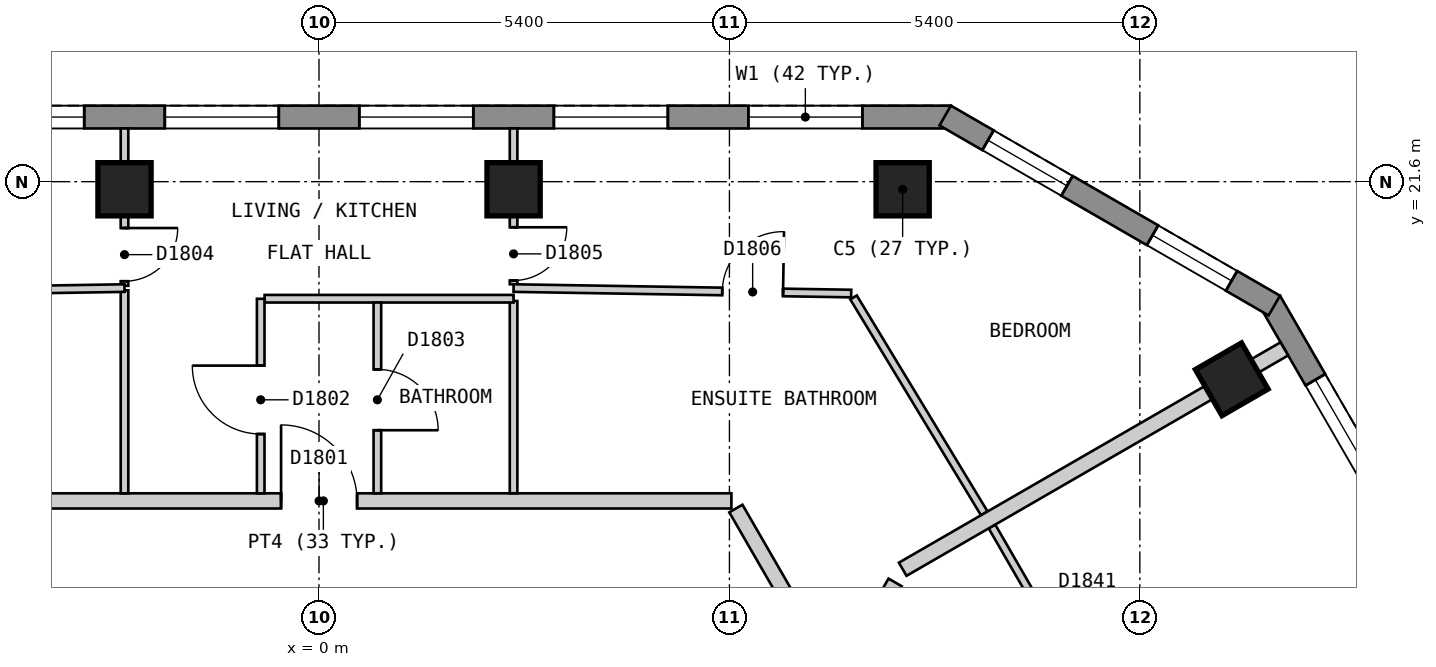
"""IFC4 building model, lengths in metres.
Left out: names, types, materials, properties, quantities, classifications, styles, units other than length and angle.
Written with IfcOpenShell. Run it as: python <this file> out.ifc"""

import sys

from ifc_helpers import new_model, si_unit, direction, frame, frame_2d, origin, origin_2d, place, context, subcontext, project, spatial, polyline, rectangle, outline, extrude, element, fill, save


model = new_model("IFC4")
c1 = context("Model", 3, precision=1e-05, world=origin(), true_north=direction((0.0, 1.0)))
c2 = subcontext(c1, "Body", "Model", "MODEL_VIEW")
j1 = project(units=[si_unit("LENGTHUNIT", "METRE"), si_unit("PLANEANGLEUNIT", "RADIAN")], contexts=[c1])
p1 = place(None, origin())
s1 = spatial("IfcSite", under=j1, at=p1, CompositionType="ELEMENT")
p2 = place(p1, origin())
s2 = spatial("IfcBuilding", under=s1, at=p2, CompositionType="ELEMENT")
p3 = place(p2, frame((0.0, 0.0, 208.8)))
s3 = spatial("IfcBuildingStorey", under=s2, at=p3, CompositionType="ELEMENT", Elevation=208.8)
for number, where, z_axis, x_axis in (
    (1, (7.679, 21.5, 0.0), (0.0, 0.0, 1.0), (-1.0, 0.0, 0.0)),
    (2, (2.56, 21.5, 0.0), (0.0, 0.0, 1.0), (-1.0, 0.0, 0.0)),
    (3, (-2.559, 21.5, 0.0), (0.0, 0.0, 1.0), (-1.0, 0.0, 0.0)),
    (4, (12.009, 19.0, 0.0), (0.0, 0.0, 1.0), (-0.5, 0.866, 0.0)),
):
    element("IfcColumn", number, at=place(p3, frame(where, z_axis=z_axis, x_axis=x_axis)), inside=s3, PredefinedType="COLUMN", context=c2, shape_type="SweptSolid", body=[
        extrude(rectangle(XDim=0.7, YDim=0.7, at=origin_2d()), origin(), (0.0, 0.0, 1.0), 3.0),
    ])
p4 = place(p3, frame((8.314, 22.45, 0.0), z_axis=(0.0, 0.0, 1.0), x_axis=(-1.0, 0.0, 0.0)))
e5 = element("IfcWall", 5, at=p4, inside=s3, PredefinedType="SOLIDWALL", context=c2, shape_type="SweptSolid", body=[
    extrude(outline(polyline([(0.0, -0.15), (16.628, -0.15), (16.548, 0.15), (0.08, 0.15), (0.0, -0.15)])), origin(), (0.0, 0.0, 1.0), 2.7),
])
p5 = place(p4, frame((1.165, 0.0, 0.15)))
e6 = element("IfcOpeningElement", 6, at=p5, cuts=e5, PredefinedType="OPENING", context=c2, shape_type="SweptSolid", body=[
    extrude(rectangle(XDim=1.5, YDim=2.1, at=frame_2d((0.75, 1.05))), frame((0.0, 0.16, 0.0), z_axis=(0.0, -1.0, 0.0), x_axis=(1.0, 0.0, 0.0)), (0.0, 0.0, 1.0), 0.32),
])
p6 = place(p4, frame((3.724, 0.0, 0.15)))
e7 = element("IfcOpeningElement", 7, at=p6, cuts=e5, PredefinedType="OPENING", context=c2, shape_type="SweptSolid", body=[
    extrude(rectangle(XDim=1.5, YDim=2.1, at=frame_2d((0.75, 1.05))), frame((0.0, 0.16, 0.0), z_axis=(0.0, -1.0, 0.0), x_axis=(1.0, 0.0, 0.0)), (0.0, 0.0, 1.0), 0.32),
])
p7 = place(p4, frame((6.284, 0.0, 0.15)))
e8 = element("IfcOpeningElement", 8, at=p7, cuts=e5, PredefinedType="OPENING", context=c2, shape_type="SweptSolid", body=[
    extrude(rectangle(XDim=1.5, YDim=2.1, at=frame_2d((0.75, 1.05))), frame((0.0, 0.16, 0.0), z_axis=(0.0, -1.0, 0.0), x_axis=(1.0, 0.0, 0.0)), (0.0, 0.0, 1.0), 0.32),
])
p8 = place(p4, frame((8.843, 0.0, 0.15)))
e9 = element("IfcOpeningElement", 9, at=p8, cuts=e5, PredefinedType="OPENING", context=c2, shape_type="SweptSolid", body=[
    extrude(rectangle(XDim=1.5, YDim=2.1, at=frame_2d((0.75, 1.05))), frame((0.0, 0.16, 0.0), z_axis=(0.0, -1.0, 0.0), x_axis=(1.0, 0.0, 0.0)), (0.0, 0.0, 1.0), 0.32),
])
p9 = place(p4, frame((11.403, 0.0, 0.15)))
e10 = element("IfcOpeningElement", 10, at=p9, cuts=e5, PredefinedType="OPENING", context=c2, shape_type="SweptSolid", body=[
    extrude(rectangle(XDim=1.5, YDim=2.1, at=frame_2d((0.75, 1.05))), frame((0.0, 0.16, 0.0), z_axis=(0.0, -1.0, 0.0), x_axis=(1.0, 0.0, 0.0)), (0.0, 0.0, 1.0), 0.32),
])
p10 = place(p4, frame((13.962, 0.0, 0.15)))
e11 = element("IfcOpeningElement", 11, at=p10, cuts=e5, PredefinedType="OPENING", context=c2, shape_type="SweptSolid", body=[
    extrude(rectangle(XDim=1.5, YDim=2.1, at=frame_2d((0.75, 1.05))), frame((0.0, 0.16, 0.0), z_axis=(0.0, -1.0, 0.0), x_axis=(1.0, 0.0, 0.0)), (0.0, 0.0, 1.0), 0.32),
])
p11 = place(p3, frame((23.599, 0.825, 0.0), z_axis=(0.0, 0.0, 1.0), x_axis=(-0.500003656944, 0.866023292436, 0.0)))
e12 = element("IfcWall", 12, at=p11, inside=s3, PredefinedType="SOLIDWALL", context=c2, shape_type="SweptSolid", body=[
    extrude(outline(polyline([(0.0, -0.15), (22.17, -0.15), (22.09, 0.15), (0.08, 0.15), (0.0, -0.15)])), origin(), (0.0, 0.0, 1.0), 2.7),
])
p12 = place(p11, frame((1.191, 0.0, 0.15)))
e13 = element("IfcOpeningElement", 13, at=p12, cuts=e12, PredefinedType="OPENING", context=c2, shape_type="SweptSolid", body=[
    extrude(rectangle(XDim=1.5, YDim=2.1, at=frame_2d((0.75, 1.05))), frame((0.0, 0.16, 0.0), z_axis=(0.0, -1.0, 0.0), x_axis=(1.0, 0.0, 0.0)), (0.0, 0.0, 1.0), 0.32),
])
p13 = place(p11, frame((3.804, 0.0, 0.15)))
e14 = element("IfcOpeningElement", 14, at=p13, cuts=e12, PredefinedType="OPENING", context=c2, shape_type="SweptSolid", body=[
    extrude(rectangle(XDim=1.5, YDim=2.1, at=frame_2d((0.75, 1.05))), frame((0.0, 0.16, 0.0), z_axis=(0.0, -1.0, 0.0), x_axis=(1.0, 0.0, 0.0)), (0.0, 0.0, 1.0), 0.32),
])
p14 = place(p11, frame((6.417, 0.0, 0.15)))
e15 = element("IfcOpeningElement", 15, at=p14, cuts=e12, PredefinedType="OPENING", context=c2, shape_type="SweptSolid", body=[
    extrude(rectangle(XDim=1.5, YDim=2.1, at=frame_2d((0.75, 1.05))), frame((0.0, 0.16, 0.0), z_axis=(0.0, -1.0, 0.0), x_axis=(1.0, 0.0, 0.0)), (0.0, 0.0, 1.0), 0.32),
])
p15 = place(p11, frame((9.029, 0.0, 0.15)))
e16 = element("IfcOpeningElement", 16, at=p15, cuts=e12, PredefinedType="OPENING", context=c2, shape_type="SweptSolid", body=[
    extrude(rectangle(XDim=1.5, YDim=2.1, at=frame_2d((0.75, 1.05))), frame((0.0, 0.16, 0.0), z_axis=(0.0, -1.0, 0.0), x_axis=(1.0, 0.0, 0.0)), (0.0, 0.0, 1.0), 0.32),
])
p16 = place(p11, frame((11.641, 0.0, 0.15)))
e17 = element("IfcOpeningElement", 17, at=p16, cuts=e12, PredefinedType="OPENING", context=c2, shape_type="SweptSolid", body=[
    extrude(rectangle(XDim=1.5, YDim=2.1, at=frame_2d((0.75, 1.05))), frame((0.0, 0.16, 0.0), z_axis=(0.0, -1.0, 0.0), x_axis=(1.0, 0.0, 0.0)), (0.0, 0.0, 1.0), 0.32),
])
p17 = place(p11, frame((14.254, 0.0, 0.15)))
e18 = element("IfcOpeningElement", 18, at=p17, cuts=e12, PredefinedType="OPENING", context=c2, shape_type="SweptSolid", body=[
    extrude(rectangle(XDim=1.5, YDim=2.1, at=frame_2d((0.75, 1.05))), frame((0.0, 0.16, 0.0), z_axis=(0.0, -1.0, 0.0), x_axis=(1.0, 0.0, 0.0)), (0.0, 0.0, 1.0), 0.32),
])
p18 = place(p11, frame((16.866, 0.0, 0.15)))
e19 = element("IfcOpeningElement", 19, at=p18, cuts=e12, PredefinedType="OPENING", context=c2, shape_type="SweptSolid", body=[
    extrude(rectangle(XDim=1.5, YDim=2.1, at=frame_2d((0.75, 1.05))), frame((0.0, 0.16, 0.0), z_axis=(0.0, -1.0, 0.0), x_axis=(1.0, 0.0, 0.0)), (0.0, 0.0, 1.0), 0.32),
])
p19 = place(p11, frame((19.479, 0.0, 0.15)))
e20 = element("IfcOpeningElement", 20, at=p19, cuts=e12, PredefinedType="OPENING", context=c2, shape_type="SweptSolid", body=[
    extrude(rectangle(XDim=1.5, YDim=2.1, at=frame_2d((0.75, 1.05))), frame((0.0, 0.16, 0.0), z_axis=(0.0, -1.0, 0.0), x_axis=(1.0, 0.0, 0.0)), (0.0, 0.0, 1.0), 0.32),
])
p20 = place(p3, frame((12.569, 19.97, 0.0), z_axis=(0.0, 0.0, 1.0), x_axis=(-0.866022959057, 0.500004234368, 0.0)))
e21 = element("IfcWall", 21, at=p20, inside=s3, PredefinedType="SOLIDWALL", context=c2, shape_type="SweptSolid", body=[
    extrude(outline(polyline([(0.0, -0.15), (5.0, -0.15), (4.92, 0.15), (0.08, 0.15), (0.0, -0.15)])), origin(), (0.0, 0.0, 1.0), 2.7),
])
p21 = place(p20, frame((0.65, 0.0, 0.15)))
e22 = element("IfcOpeningElement", 22, at=p21, cuts=e21, PredefinedType="OPENING", context=c2, shape_type="SweptSolid", body=[
    extrude(rectangle(XDim=1.2, YDim=2.1, at=frame_2d((0.6, 1.05))), frame((0.0, 0.16, 0.0), z_axis=(0.0, -1.0, 0.0), x_axis=(1.0, 0.0, 0.0)), (0.0, 0.0, 1.0), 0.32),
])
p22 = place(p20, frame((3.15, 0.0, 0.15)))
e23 = element("IfcOpeningElement", 23, at=p22, cuts=e21, PredefinedType="OPENING", context=c2, shape_type="SweptSolid", body=[
    extrude(rectangle(XDim=1.2, YDim=2.1, at=frame_2d((0.6, 1.05))), frame((0.0, 0.16, 0.0), z_axis=(0.0, -1.0, 0.0), x_axis=(1.0, 0.0, 0.0)), (0.0, 0.0, 1.0), 0.32),
])
p23 = place(p3, frame((5.485, 17.3, 0.0), z_axis=(0.0, 0.0, 1.0), x_axis=(0.499943285704, -0.866058145322, 0.0)))
e24 = element("IfcWall", 24, at=p23, inside=s3, PredefinedType="PARTITIONING", context=c2, shape_type="SweptSolid", body=[
    extrude(rectangle(XDim=10.623, YDim=0.2, at=frame_2d((5.312, 0.0))), origin(), (0.0, 0.0, 1.0), 2.7),
])
p24 = place(p23, frame((3.901, 0.0, 0.0)))
e25 = element("IfcOpeningElement", 25, at=p24, cuts=e24, PredefinedType="OPENING", context=c2, shape_type="SweptSolid", body=[
    extrude(rectangle(XDim=1.0, YDim=2.1, at=frame_2d((0.5, 1.05))), frame((0.0, 0.11, 0.0), z_axis=(0.0, -1.0, 0.0), x_axis=(1.0, 0.0, 0.0)), (0.0, 0.0, 1.0), 0.22),
])
p25 = place(p3, frame((-5.311, 17.4, 0.0), z_axis=(0.0, 0.0, 1.0), x_axis=(1.0, 0.0, 0.0)))
e26 = element("IfcWall", 26, at=p25, inside=s3, PredefinedType="PARTITIONING", context=c2, shape_type="SweptSolid", body=[
    extrude(rectangle(XDim=10.737, YDim=0.2, at=frame_2d((5.369, 0.0))), origin(), (0.0, 0.0, 1.0), 2.7),
])
p26 = place(p25, frame((4.812, 0.0, 0.0)))
e27 = element("IfcOpeningElement", 27, at=p26, cuts=e26, PredefinedType="OPENING", context=c2, shape_type="SweptSolid", body=[
    extrude(rectangle(XDim=1.0, YDim=2.1, at=frame_2d((0.5, 1.05))), frame((0.0, 0.11, 0.0), z_axis=(0.0, -1.0, 0.0), x_axis=(1.0, 0.0, 0.0)), (0.0, 0.0, 1.0), 0.22),
])
p27 = place(p3, frame((7.033, 20.077, 0.0), z_axis=(0.0, 0.0, 1.0), x_axis=(0.517918779664, -0.855429797044, 0.0)))
e28 = element("IfcWall", 28, at=p27, inside=s3, PredefinedType="PARTITIONING", context=c2, shape_type="SweptSolid", body=[
    extrude(rectangle(XDim=3.321, YDim=0.1, at=frame_2d((1.661, 0.0))), origin(), (0.0, 0.0, 1.0), 2.7),
])
p28 = place(p3, frame((8.854, 17.064, 0.0), z_axis=(0.0, 0.0, 1.0), x_axis=(0.500042049778, -0.866001124973, 0.0)))
e29 = element("IfcWall", 29, at=p28, inside=s3, PredefinedType="PARTITIONING", context=c2, shape_type="SweptSolid", body=[
    extrude(rectangle(XDim=5.025, YDim=0.1, at=frame_2d((2.513, 0.0))), origin(), (0.0, 0.0, 1.0), 2.7),
])
p29 = place(p28, frame((2.063, 0.0, 0.0)))
e30 = element("IfcOpeningElement", 30, at=p29, cuts=e29, PredefinedType="OPENING", context=c2, shape_type="SweptSolid", body=[
    extrude(rectangle(XDim=0.9, YDim=2.1, at=frame_2d((0.45, 1.05))), frame((0.0, 0.06, 0.0), z_axis=(0.0, -1.0, 0.0), x_axis=(1.0, 0.0, 0.0)), (0.0, 0.0, 1.0), 0.12),
])
p30 = place(p3, frame((-2.559, 20.17, 0.0), z_axis=(0.0, 0.0, 1.0), x_axis=(0.0, -1.0, 0.0)))
e31 = element("IfcWall", 31, at=p30, inside=s3, PredefinedType="PARTITIONING", context=c2, shape_type="SweptSolid", body=[
    extrude(rectangle(XDim=2.67, YDim=0.1, at=frame_2d((1.335, 0.0))), origin(), (0.0, 0.0, 1.0), 2.7),
])
p31 = place(p3, frame((2.56, 22.3, 0.0), z_axis=(0.0, 0.0, 1.0), x_axis=(0.0, -1.0, 0.0)))
e32 = element("IfcWall", 32, at=p31, inside=s3, PredefinedType="PARTITIONING", context=c2, shape_type="SweptSolid", body=[
    extrude(rectangle(XDim=2.05, YDim=0.1, at=frame_2d((1.025, 0.0))), origin(), (0.0, 0.0, 1.0), 2.7),
])
p32 = place(p31, frame((1.3, 0.0, 0.0)))
e33 = element("IfcOpeningElement", 33, at=p32, cuts=e32, PredefinedType="OPENING", context=c2, shape_type="SweptSolid", body=[
    extrude(rectangle(XDim=0.7, YDim=2.1, at=frame_2d((0.35, 1.05))), frame((0.0, 0.06, 0.0), z_axis=(0.0, -1.0, 0.0), x_axis=(1.0, 0.0, 0.0)), (0.0, 0.0, 1.0), 0.12),
])
p33 = place(p3, frame((2.56, 20.03, 0.0), z_axis=(0.0, 0.0, 1.0), x_axis=(0.0, -1.0, 0.0)))
e34 = element("IfcWall", 34, at=p33, inside=s3, PredefinedType="PARTITIONING", context=c2, shape_type="SweptSolid", body=[
    extrude(rectangle(XDim=2.53, YDim=0.1, at=frame_2d((1.265, 0.0))), origin(), (0.0, 0.0, 1.0), 2.7),
])
p34 = place(p3, frame((2.56, 20.2, 0.0), z_axis=(0.0, 0.0, 1.0), x_axis=(0.999868576801, -0.016212005615, 0.0)))
e35 = element("IfcWall", 35, at=p34, inside=s3, PredefinedType="PARTITIONING", context=c2, shape_type="SweptSolid", body=[
    extrude(rectangle(XDim=4.442, YDim=0.1, at=frame_2d((2.221, 0.0))), origin(), (0.0, 0.0, 1.0), 2.7),
])
p35 = place(p34, frame((2.746, 0.0, 0.0)))
e36 = element("IfcOpeningElement", 36, at=p35, cuts=e35, PredefinedType="OPENING", context=c2, shape_type="SweptSolid", body=[
    extrude(rectangle(XDim=0.8, YDim=2.1, at=frame_2d((0.4, 1.05))), frame((0.0, 0.06, 0.0), z_axis=(0.0, -1.0, 0.0), x_axis=(1.0, 0.0, 0.0)), (0.0, 0.0, 1.0), 0.12),
])
p36 = place(p3, frame((-0.716, 20.06, 0.0), z_axis=(0.0, 0.0, 1.0), x_axis=(1.0, 0.0, 0.0)))
e37 = element("IfcWall", 37, at=p36, inside=s3, PredefinedType="PARTITIONING", context=c2, shape_type="SweptSolid", body=[
    extrude(rectangle(XDim=3.276, YDim=0.1, at=frame_2d((1.638, 0.0))), origin(), (0.0, 0.0, 1.0), 2.7),
])
p37 = place(p3, frame((0.768, 17.5, 0.0), z_axis=(0.0, 0.0, 1.0), x_axis=(0.0, 1.0, 0.0)))
e38 = element("IfcWall", 38, at=p37, inside=s3, PredefinedType="PARTITIONING", context=c2, shape_type="SweptSolid", body=[
    extrude(rectangle(XDim=2.51, YDim=0.1, at=frame_2d((1.255, 0.0))), origin(), (0.0, 0.0, 1.0), 2.7),
])
p38 = place(p37, frame((0.83, 0.0, 0.0)))
e39 = element("IfcOpeningElement", 39, at=p38, cuts=e38, PredefinedType="OPENING", context=c2, shape_type="SweptSolid", body=[
    extrude(rectangle(XDim=0.8, YDim=2.1, at=frame_2d((0.4, 1.05))), frame((0.0, 0.06, 0.0), z_axis=(0.0, -1.0, 0.0), x_axis=(1.0, 0.0, 0.0)), (0.0, 0.0, 1.0), 0.12),
])
p39 = place(p3, frame((-0.767, 17.5, 0.0), z_axis=(0.0, 0.0, 1.0), x_axis=(0.0, 1.0, 0.0)))
e40 = element("IfcWall", 40, at=p39, inside=s3, PredefinedType="PARTITIONING", context=c2, shape_type="SweptSolid", body=[
    extrude(rectangle(XDim=2.559, YDim=0.1, at=frame_2d((1.28, 0.0))), origin(), (0.0, 0.0, 1.0), 2.7),
])
p40 = place(p39, frame((0.78, 0.0, 0.0)))
e41 = element("IfcOpeningElement", 41, at=p40, cuts=e40, PredefinedType="OPENING", context=c2, shape_type="SweptSolid", body=[
    extrude(rectangle(XDim=0.9, YDim=2.1, at=frame_2d((0.45, 1.05))), frame((0.0, 0.06, 0.0), z_axis=(0.0, -1.0, 0.0), x_axis=(1.0, 0.0, 0.0)), (0.0, 0.0, 1.0), 0.12),
])
p41 = place(p3, frame((-2.559, 20.23, 0.0), z_axis=(0.0, 0.0, 1.0), x_axis=(0.0, 1.0, 0.0)))
e42 = element("IfcWall", 42, at=p41, inside=s3, PredefinedType="PARTITIONING", context=c2, shape_type="SweptSolid", body=[
    extrude(rectangle(XDim=2.07, YDim=0.1, at=frame_2d((1.035, 0.0))), origin(), (0.0, 0.0, 1.0), 2.7),
])
p42 = place(p41, frame((0.06, 0.0, 0.0)))
e43 = element("IfcOpeningElement", 43, at=p42, cuts=e42, PredefinedType="OPENING", context=c2, shape_type="SweptSolid", body=[
    extrude(rectangle(XDim=0.7, YDim=2.1, at=frame_2d((0.35, 1.05))), frame((0.0, 0.06, 0.0), z_axis=(0.0, -1.0, 0.0), x_axis=(1.0, 0.0, 0.0)), (0.0, 0.0, 1.0), 0.12),
])
p43 = place(p3, frame((-7.002, 20.128, 0.0), z_axis=(0.0, 0.0, 1.0), x_axis=(0.999868634558, 0.016208443081, 0.0)))
e44 = element("IfcWall", 44, at=p43, inside=s3, PredefinedType="PARTITIONING", context=c2, shape_type="SweptSolid", body=[
    extrude(rectangle(XDim=4.443, YDim=0.1, at=frame_2d((2.222, 0.0))), origin(), (0.0, 0.0, 1.0), 2.7),
])
p44 = place(p43, frame((1.475, 0.0, 0.0)))
e45 = element("IfcOpeningElement", 45, at=p44, cuts=e44, PredefinedType="OPENING", context=c2, shape_type="SweptSolid", body=[
    extrude(rectangle(XDim=0.8, YDim=2.1, at=frame_2d((0.4, 1.05))), frame((0.0, 0.06, 0.0), z_axis=(0.0, -1.0, 0.0), x_axis=(1.0, 0.0, 0.0)), (0.0, 0.0, 1.0), 0.12),
])
p45 = place(p3, frame((6.871, 15.1, 0.0), z_axis=(0.0, 0.0, 1.0), x_axis=(0.50006528296, 0.865987709369, 0.0)))
e46 = element("IfcWall", 46, at=p45, inside=s3, PredefinedType="PARTITIONING", context=c2, shape_type="SweptSolid", body=[
    extrude(rectangle(XDim=1.418, YDim=0.2, at=frame_2d((0.709, 0.0))), origin(), (0.0, 0.0, 1.0), 2.7),
])
p46 = place(p3, frame((7.68, 16.501, 0.0), z_axis=(0.0, 0.0, 1.0), x_axis=(0.86602149507, 0.500006770031, 0.0)))
e47 = element("IfcWall", 47, at=p46, inside=s3, PredefinedType="PARTITIONING", context=c2, shape_type="SweptSolid", body=[
    extrude(rectangle(XDim=5.798, YDim=0.2, at=frame_2d((2.899, 0.0))), origin(), (0.0, 0.0, 1.0), 2.7),
])
p47 = place(p5, origin())
e48 = element("IfcWindow", 48, at=p47, inside=s3, PartitioningType="SINGLE_PANEL", PredefinedType="WINDOW", context=c2, shape_type="SweptSolid", body=[
    extrude(rectangle(XDim=1.5, YDim=2.1, at=frame_2d((0.75, 1.05))), frame((0.0, 0.03, 0.0), z_axis=(0.0, -1.0, 0.0), x_axis=(1.0, 0.0, 0.0)), (0.0, 0.0, 1.0), 0.06),
])
fill(e6, e48)
p48 = place(p6, origin())
e49 = element("IfcWindow", 49, at=p48, inside=s3, PartitioningType="SINGLE_PANEL", PredefinedType="WINDOW", context=c2, shape_type="SweptSolid", body=[
    extrude(rectangle(XDim=1.5, YDim=2.1, at=frame_2d((0.75, 1.05))), frame((0.0, 0.03, 0.0), z_axis=(0.0, -1.0, 0.0), x_axis=(1.0, 0.0, 0.0)), (0.0, 0.0, 1.0), 0.06),
])
fill(e7, e49)
p49 = place(p7, origin())
e50 = element("IfcWindow", 50, at=p49, inside=s3, PartitioningType="SINGLE_PANEL", PredefinedType="WINDOW", context=c2, shape_type="SweptSolid", body=[
    extrude(rectangle(XDim=1.5, YDim=2.1, at=frame_2d((0.75, 1.05))), frame((0.0, 0.03, 0.0), z_axis=(0.0, -1.0, 0.0), x_axis=(1.0, 0.0, 0.0)), (0.0, 0.0, 1.0), 0.06),
])
fill(e8, e50)
p50 = place(p8, origin())
e51 = element("IfcWindow", 51, at=p50, inside=s3, PartitioningType="SINGLE_PANEL", PredefinedType="WINDOW", context=c2, shape_type="SweptSolid", body=[
    extrude(rectangle(XDim=1.5, YDim=2.1, at=frame_2d((0.75, 1.05))), frame((0.0, 0.03, 0.0), z_axis=(0.0, -1.0, 0.0), x_axis=(1.0, 0.0, 0.0)), (0.0, 0.0, 1.0), 0.06),
])
fill(e9, e51)
p51 = place(p9, origin())
e52 = element("IfcWindow", 52, at=p51, inside=s3, PartitioningType="SINGLE_PANEL", PredefinedType="WINDOW", context=c2, shape_type="SweptSolid", body=[
    extrude(rectangle(XDim=1.5, YDim=2.1, at=frame_2d((0.75, 1.05))), frame((0.0, 0.03, 0.0), z_axis=(0.0, -1.0, 0.0), x_axis=(1.0, 0.0, 0.0)), (0.0, 0.0, 1.0), 0.06),
])
fill(e10, e52)
p52 = place(p19, origin())
e53 = element("IfcWindow", 53, at=p52, inside=s3, PartitioningType="SINGLE_PANEL", PredefinedType="WINDOW", context=c2, shape_type="SweptSolid", body=[
    extrude(rectangle(XDim=1.5, YDim=2.1, at=frame_2d((0.75, 1.05))), frame((0.0, 0.03, 0.0), z_axis=(0.0, -1.0, 0.0), x_axis=(1.0, 0.0, 0.0)), (0.0, 0.0, 1.0), 0.06),
])
fill(e20, e53)
p53 = place(p21, origin())
e54 = element("IfcWindow", 54, at=p53, inside=s3, PartitioningType="SINGLE_PANEL", PredefinedType="WINDOW", context=c2, shape_type="SweptSolid", body=[
    extrude(rectangle(XDim=1.2, YDim=2.1, at=frame_2d((0.6, 1.05))), frame((0.0, 0.03, 0.0), z_axis=(0.0, -1.0, 0.0), x_axis=(1.0, 0.0, 0.0)), (0.0, 0.0, 1.0), 0.06),
])
fill(e22, e54)
p54 = place(p22, origin())
e55 = element("IfcWindow", 55, at=p54, inside=s3, PartitioningType="SINGLE_PANEL", PredefinedType="WINDOW", context=c2, shape_type="SweptSolid", body=[
    extrude(rectangle(XDim=1.2, YDim=2.1, at=frame_2d((0.6, 1.05))), frame((0.0, 0.03, 0.0), z_axis=(0.0, -1.0, 0.0), x_axis=(1.0, 0.0, 0.0)), (0.0, 0.0, 1.0), 0.06),
])
fill(e23, e55)
p55 = place(p26, origin())
e56 = element("IfcDoor", 56, at=p55, inside=s3, OperationType="SINGLE_SWING_LEFT", PredefinedType="DOOR", context=c2, shape_type="SweptSolid", body=[
    extrude(rectangle(XDim=1.0, YDim=2.1, at=frame_2d((0.5, 1.05))), frame((0.0, 0.025, 0.0), z_axis=(0.0, -1.0, 0.0), x_axis=(1.0, 0.0, 0.0)), (0.0, 0.0, 1.0), 0.05),
])
fill(e27, e56)
p56 = place(p40, origin())
e57 = element("IfcDoor", 57, at=p56, inside=s3, OperationType="SINGLE_SWING_RIGHT", PredefinedType="DOOR", context=c2, shape_type="SweptSolid", body=[
    extrude(rectangle(XDim=0.9, YDim=2.1, at=frame_2d((0.45, 1.05))), frame((0.0, 0.025, 0.0), z_axis=(0.0, -1.0, 0.0), x_axis=(1.0, 0.0, 0.0)), (0.0, 0.0, 1.0), 0.05),
])
fill(e41, e57)
p57 = place(p38, origin())
e58 = element("IfcDoor", 58, at=p57, inside=s3, OperationType="SINGLE_SWING_LEFT", PredefinedType="DOOR", context=c2, shape_type="SweptSolid", body=[
    extrude(rectangle(XDim=0.8, YDim=2.1, at=frame_2d((0.4, 1.05))), frame((0.0, 0.025, 0.0), z_axis=(0.0, -1.0, 0.0), x_axis=(1.0, 0.0, 0.0)), (0.0, 0.0, 1.0), 0.05),
])
fill(e39, e58)
p58 = place(p42, origin())
e59 = element("IfcDoor", 59, at=p58, inside=s3, OperationType="SINGLE_SWING_RIGHT", PredefinedType="DOOR", context=c2, shape_type="SweptSolid", body=[
    extrude(rectangle(XDim=0.7, YDim=2.1, at=frame_2d((0.35, 1.05))), frame((0.0, 0.025, 0.0), z_axis=(0.0, -1.0, 0.0), x_axis=(1.0, 0.0, 0.0)), (0.0, 0.0, 1.0), 0.05),
])
fill(e43, e59)
p59 = place(p32, origin())
e60 = element("IfcDoor", 60, at=p59, inside=s3, OperationType="SINGLE_SWING_LEFT", PredefinedType="DOOR", context=c2, shape_type="SweptSolid", body=[
    extrude(rectangle(XDim=0.7, YDim=2.1, at=frame_2d((0.35, 1.05))), frame((0.0, 0.025, 0.0), z_axis=(0.0, -1.0, 0.0), x_axis=(1.0, 0.0, 0.0)), (0.0, 0.0, 1.0), 0.05),
])
fill(e33, e60)
p60 = place(p35, origin())
e61 = element("IfcDoor", 61, at=p60, inside=s3, OperationType="SINGLE_SWING_RIGHT", PredefinedType="DOOR", context=c2, shape_type="SweptSolid", body=[
    extrude(rectangle(XDim=0.8, YDim=2.1, at=frame_2d((0.4, 1.05))), frame((0.0, 0.025, 0.0), z_axis=(0.0, -1.0, 0.0), x_axis=(1.0, 0.0, 0.0)), (0.0, 0.0, 1.0), 0.05),
])
fill(e36, e61)
save(model, sys.argv[1])
